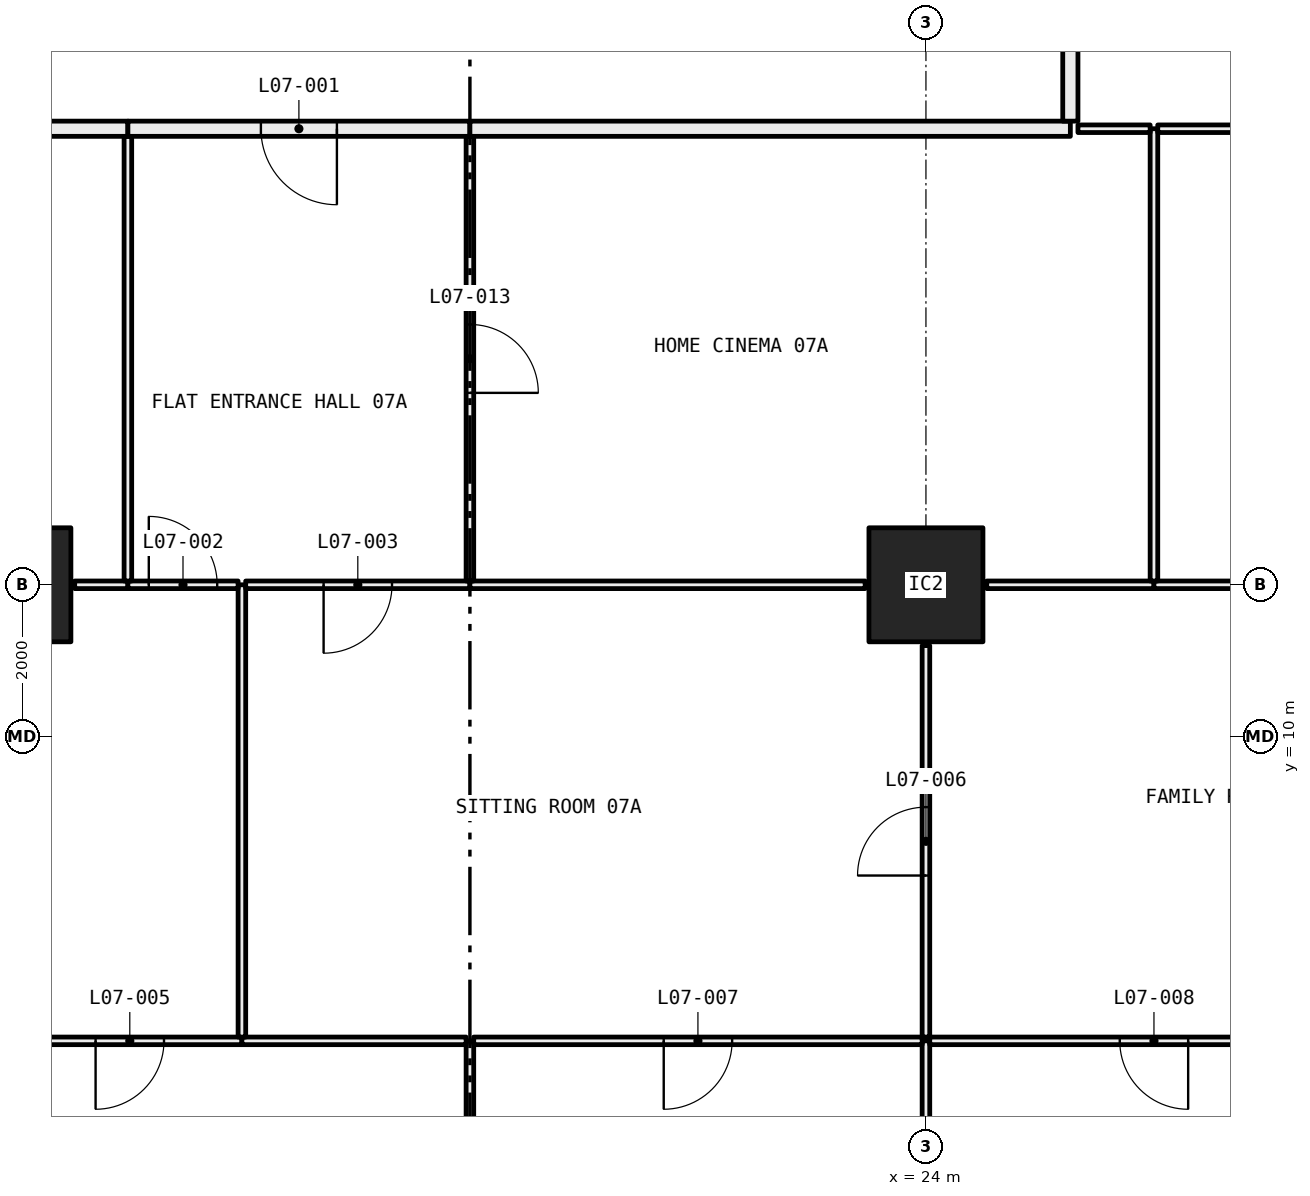
"""IFC4 building model, lengths in metres.
Left out: names, types, materials, properties, quantities, classifications, styles, units other than length and angle.
Written with IfcOpenShell. Run it as: python <this file> out.ifc"""

import sys

from ifc_helpers import new_model, si_unit, direction, frame, frame_2d, origin, origin_2d, place, context, subcontext, project, spatial, rectangle, hollow_rectangle, extrude, element, fill, save


model = new_model("IFC4")
c1 = context("Model", 3, precision=1e-05, world=origin(), true_north=direction((0.0, 1.0)))
c2 = subcontext(c1, "Body", "Model", "MODEL_VIEW")
j1 = project(units=[si_unit("LENGTHUNIT", "METRE"), si_unit("PLANEANGLEUNIT", "RADIAN")], contexts=[c1])
p1 = place(None, origin())
s1 = spatial("IfcSite", under=j1, at=p1, CompositionType="ELEMENT")
p2 = place(p1, origin())
s2 = spatial("IfcBuilding", under=s1, at=p2, CompositionType="ELEMENT")
p3 = place(p2, frame((0.0, 0.0, 36.9)))
s3 = spatial("IfcBuildingStorey", under=s2, at=p3, CompositionType="ELEMENT", Elevation=36.9)
for number, where, z_axis, x_axis in (
    (1, (12.0, 12.0, 0.0), (0.0, 0.0, 1.0), (1.0, 0.0, 0.0)),
    (2, (24.0, 12.0, 0.0), (0.0, 0.0, 1.0), (1.0, 0.0, 0.0)),
):
    element("IfcColumn", number, at=place(p3, frame(where, z_axis=z_axis, x_axis=x_axis)), inside=s3, PredefinedType="COLUMN", context=c2, shape_type="SweptSolid", body=[
        extrude(hollow_rectangle(XDim=1.5, YDim=1.5, WallThickness=0.065, at=origin_2d()), origin(), (0.0, 0.0, 1.0), 3.05),
    ])
p4 = place(p3, frame((18.0, 0.72, 0.0), z_axis=(0.0, 0.0, 1.0), x_axis=(0.0, 1.0, 0.0)))
e3 = element("IfcWall", 3, at=p4, inside=s3, PredefinedType="PARTITIONING", context=c2, shape_type="SweptSolid", body=[
    extrude(rectangle(XDim=5.28, YDim=0.1, at=frame_2d((2.64, 0.0))), origin(), (0.0, 0.0, 1.0), 3.05),
])
p5 = place(p3, frame((15.0, 6.0, 0.0), z_axis=(0.0, 0.0, 1.0), x_axis=(-1.0, 0.0, 0.0)))
e4 = element("IfcWall", 4, at=p5, inside=s3, PredefinedType="PARTITIONING", context=c2, shape_type="SweptSolid", body=[
    extrude(rectangle(XDim=2.95, YDim=0.1, at=frame_2d((1.475, 0.0))), origin(), (0.0, 0.0, 1.0), 2.45),
])
p6 = place(p5, frame((1.025, 0.0, 0.0)))
e5 = element("IfcOpeningElement", 5, at=p6, cuts=e4, PredefinedType="OPENING", context=c2, shape_type="SweptSolid", body=[
    extrude(rectangle(XDim=0.9, YDim=2.1, at=frame_2d((0.45, 1.05))), frame((0.0, 0.06, 0.0), z_axis=(0.0, -1.0, 0.0), x_axis=(1.0, 0.0, 0.0)), (0.0, 0.0, 1.0), 0.12),
])
p7 = place(p3, frame((17.95, 6.0, 0.0), z_axis=(0.0, 0.0, 1.0), x_axis=(-1.0, 0.0, 0.0)))
e6 = element("IfcWall", 6, at=p7, inside=s3, PredefinedType="PARTITIONING", context=c2, shape_type="SweptSolid", body=[
    extrude(rectangle(XDim=2.95, YDim=0.1, at=frame_2d((1.475, 0.0))), origin(), (0.0, 0.0, 1.0), 3.05),
])
p8 = place(p3, frame((24.0, 0.72, 0.0), z_axis=(0.0, 0.0, 1.0), x_axis=(0.0, 1.0, 0.0)))
e7 = element("IfcWall", 7, at=p8, inside=s3, PredefinedType="PARTITIONING", context=c2, shape_type="SweptSolid", body=[
    extrude(rectangle(XDim=5.28, YDim=0.1, at=frame_2d((2.64, 0.0))), origin(), (0.0, 0.0, 1.0), 2.45),
])
p9 = place(p3, frame((23.95, 6.0, 0.0), z_axis=(0.0, 0.0, 1.0), x_axis=(-1.0, 0.0, 0.0)))
e8 = element("IfcWall", 8, at=p9, inside=s3, PredefinedType="PARTITIONING", context=c2, shape_type="SweptSolid", body=[
    extrude(rectangle(XDim=5.9, YDim=0.1, at=frame_2d((2.95, 0.0))), origin(), (0.0, 0.0, 1.0), 2.45),
])
p10 = place(p9, frame((2.5, 0.0, 0.0)))
e9 = element("IfcOpeningElement", 9, at=p10, cuts=e8, PredefinedType="OPENING", context=c2, shape_type="SweptSolid", body=[
    extrude(rectangle(XDim=0.9, YDim=2.1, at=frame_2d((0.45, 1.05))), frame((0.0, 0.06, 0.0), z_axis=(0.0, -1.0, 0.0), x_axis=(1.0, 0.0, 0.0)), (0.0, 0.0, 1.0), 0.12),
])
p11 = place(p3, frame((29.95, 6.0, 0.0), z_axis=(0.0, 0.0, 1.0), x_axis=(-1.0, 0.0, 0.0)))
e10 = element("IfcWall", 10, at=p11, inside=s3, PredefinedType="PARTITIONING", context=c2, shape_type="SweptSolid", body=[
    extrude(rectangle(XDim=5.9, YDim=0.1, at=frame_2d((2.95, 0.0))), origin(), (0.0, 0.0, 1.0), 2.45),
])
p12 = place(p11, frame((2.5, 0.0, 0.0)))
e11 = element("IfcOpeningElement", 11, at=p12, cuts=e10, PredefinedType="OPENING", context=c2, shape_type="SweptSolid", body=[
    extrude(rectangle(XDim=0.9, YDim=2.1, at=frame_2d((0.45, 1.05))), frame((0.0, 0.06, 0.0), z_axis=(0.0, -1.0, 0.0), x_axis=(1.0, 0.0, 0.0)), (0.0, 0.0, 1.0), 0.12),
])
p13 = place(p3, frame((15.0, 6.05, 0.0), z_axis=(0.0, 0.0, 1.0), x_axis=(0.0, 1.0, 0.0)))
e12 = element("IfcWall", 12, at=p13, inside=s3, PredefinedType="PARTITIONING", context=c2, shape_type="SweptSolid", body=[
    extrude(rectangle(XDim=5.95, YDim=0.1, at=frame_2d((2.975, 0.0))), origin(), (0.0, 0.0, 1.0), 2.45),
])
p14 = place(p3, frame((13.5, 12.0, 0.0), z_axis=(0.0, 0.0, 1.0), x_axis=(-1.0, 0.0, 0.0)))
e13 = element("IfcWall", 13, at=p14, inside=s3, PredefinedType="PARTITIONING", context=c2, shape_type="SweptSolid", body=[
    extrude(rectangle(XDim=0.7, YDim=0.1, at=frame_2d((0.35, 0.0))), origin(), (0.0, 0.0, 1.0), 2.45),
])
p15 = place(p3, frame((14.95, 12.0, 0.0), z_axis=(0.0, 0.0, 1.0), x_axis=(-1.0, 0.0, 0.0)))
e14 = element("IfcWall", 14, at=p15, inside=s3, PredefinedType="PARTITIONING", context=c2, shape_type="SweptSolid", body=[
    extrude(rectangle(XDim=1.45, YDim=0.1, at=frame_2d((0.725, 0.0))), origin(), (0.0, 0.0, 1.0), 2.45),
])
p16 = place(p15, frame((0.275, 0.0, 0.0)))
e15 = element("IfcOpeningElement", 15, at=p16, cuts=e14, PredefinedType="OPENING", context=c2, shape_type="SweptSolid", body=[
    extrude(rectangle(XDim=0.9, YDim=2.1, at=frame_2d((0.45, 1.05))), frame((0.0, 0.06, 0.0), z_axis=(0.0, -1.0, 0.0), x_axis=(1.0, 0.0, 0.0)), (0.0, 0.0, 1.0), 0.12),
])
p17 = place(p3, frame((24.0, 6.05, 0.0), z_axis=(0.0, 0.0, 1.0), x_axis=(0.0, 1.0, 0.0)))
e16 = element("IfcWall", 16, at=p17, inside=s3, PredefinedType="PARTITIONING", context=c2, shape_type="SweptSolid", body=[
    extrude(rectangle(XDim=5.15, YDim=0.1, at=frame_2d((2.575, 0.0))), origin(), (0.0, 0.0, 1.0), 2.45),
])
p18 = place(p17, frame((2.125, 0.0, 0.0)))
e17 = element("IfcOpeningElement", 17, at=p18, cuts=e16, PredefinedType="OPENING", context=c2, shape_type="SweptSolid", body=[
    extrude(rectangle(XDim=0.9, YDim=2.1, at=frame_2d((0.45, 1.05))), frame((0.0, 0.06, 0.0), z_axis=(0.0, -1.0, 0.0), x_axis=(1.0, 0.0, 0.0)), (0.0, 0.0, 1.0), 0.12),
])
p19 = place(p3, frame((18.0, 12.0, 0.0), z_axis=(0.0, 0.0, 1.0), x_axis=(-1.0, 0.0, 0.0)))
e18 = element("IfcWall", 18, at=p19, inside=s3, PredefinedType="PARTITIONING", context=c2, shape_type="SweptSolid", body=[
    extrude(rectangle(XDim=2.95, YDim=0.1, at=frame_2d((1.475, 0.0))), origin(), (0.0, 0.0, 1.0), 2.45),
])
p20 = place(p19, frame((1.025, 0.0, 0.0)))
e19 = element("IfcOpeningElement", 19, at=p20, cuts=e18, PredefinedType="OPENING", context=c2, shape_type="SweptSolid", body=[
    extrude(rectangle(XDim=0.9, YDim=2.1, at=frame_2d((0.45, 1.05))), frame((0.0, 0.06, 0.0), z_axis=(0.0, -1.0, 0.0), x_axis=(1.0, 0.0, 0.0)), (0.0, 0.0, 1.0), 0.12),
])
p21 = place(p3, frame((23.2, 12.0, 0.0), z_axis=(0.0, 0.0, 1.0), x_axis=(-1.0, 0.0, 0.0)))
e20 = element("IfcWall", 20, at=p21, inside=s3, PredefinedType="PARTITIONING", context=c2, shape_type="SweptSolid", body=[
    extrude(rectangle(XDim=5.2, YDim=0.1, at=frame_2d((2.6, 0.0))), origin(), (0.0, 0.0, 1.0), 2.45),
])
p22 = place(p3, frame((27.0, 12.0, 0.0), z_axis=(0.0, 0.0, 1.0), x_axis=(-1.0, 0.0, 0.0)))
e21 = element("IfcWall", 21, at=p22, inside=s3, PredefinedType="PARTITIONING", context=c2, shape_type="SweptSolid", body=[
    extrude(rectangle(XDim=2.2, YDim=0.1, at=frame_2d((1.1, 0.0))), origin(), (0.0, 0.0, 1.0), 2.45),
])
p23 = place(p3, frame((32.95, 12.0, 0.0), z_axis=(0.0, 0.0, 1.0), x_axis=(-1.0, 0.0, 0.0)))
e22 = element("IfcWall", 22, at=p23, inside=s3, PredefinedType="PARTITIONING", context=c2, shape_type="SweptSolid", body=[
    extrude(rectangle(XDim=5.95, YDim=0.1, at=frame_2d((2.975, 0.0))), origin(), (0.0, 0.0, 1.0), 2.45),
])
p24 = place(p23, frame((2.525, 0.0, 0.0)))
e23 = element("IfcOpeningElement", 23, at=p24, cuts=e22, PredefinedType="OPENING", context=c2, shape_type="SweptSolid", body=[
    extrude(rectangle(XDim=0.9, YDim=2.1, at=frame_2d((0.45, 1.05))), frame((0.0, 0.06, 0.0), z_axis=(0.0, -1.0, 0.0), x_axis=(1.0, 0.0, 0.0)), (0.0, 0.0, 1.0), 0.12),
])
p25 = place(p3, frame((13.5, 12.05, 0.0), z_axis=(0.0, 0.0, 1.0), x_axis=(0.0, 1.0, 0.0)))
e24 = element("IfcWall", 24, at=p25, inside=s3, PredefinedType="PARTITIONING", context=c2, shape_type="SweptSolid", body=[
    extrude(rectangle(XDim=5.85, YDim=0.1, at=frame_2d((2.925, 0.0))), origin(), (0.0, 0.0, 1.0), 2.45),
])
p26 = place(p3, frame((13.5, 18.0, 0.0), z_axis=(0.0, 0.0, 1.0), x_axis=(-1.0, 0.0, 0.0)))
e25 = element("IfcWall", 25, at=p26, inside=s3, PredefinedType="PARTITIONING", context=c2, shape_type="SweptSolid", body=[
    extrude(rectangle(XDim=3.4, YDim=0.2, at=frame_2d((1.7, 0.0))), origin(), (0.0, 0.0, 1.0), 3.05),
])
p27 = place(p3, frame((18.0, 12.05, 0.0), z_axis=(0.0, 0.0, 1.0), x_axis=(0.0, 1.0, 0.0)))
e26 = element("IfcWall", 26, at=p27, inside=s3, PredefinedType="PARTITIONING", context=c2, shape_type="SweptSolid", body=[
    extrude(rectangle(XDim=5.85, YDim=0.1, at=frame_2d((2.925, 0.0))), origin(), (0.0, 0.0, 1.0), 2.45),
])
p28 = place(p27, frame((2.475, 0.0, 0.0)))
e27 = element("IfcOpeningElement", 27, at=p28, cuts=e26, PredefinedType="OPENING", context=c2, shape_type="SweptSolid", body=[
    extrude(rectangle(XDim=0.9, YDim=2.1, at=frame_2d((0.45, 1.05))), frame((0.0, 0.06, 0.0), z_axis=(0.0, -1.0, 0.0), x_axis=(1.0, 0.0, 0.0)), (0.0, 0.0, 1.0), 0.12),
])
p29 = place(p3, frame((18.0, 18.0, 0.0), z_axis=(0.0, 0.0, 1.0), x_axis=(-1.0, 0.0, 0.0)))
e28 = element("IfcWall", 28, at=p29, inside=s3, PredefinedType="PARTITIONING", context=c2, shape_type="SweptSolid", body=[
    extrude(rectangle(XDim=4.5, YDim=0.2, at=frame_2d((2.25, 0.0))), origin(), (0.0, 0.0, 1.0), 3.05),
])
p30 = place(p29, frame((1.75, 0.0, 0.0)))
e29 = element("IfcOpeningElement", 29, at=p30, cuts=e28, PredefinedType="OPENING", context=c2, shape_type="SweptSolid", body=[
    extrude(rectangle(XDim=1.0, YDim=2.1, at=frame_2d((0.5, 1.05))), frame((0.0, 0.11, 0.0), z_axis=(0.0, -1.0, 0.0), x_axis=(1.0, 0.0, 0.0)), (0.0, 0.0, 1.0), 0.22),
])
p31 = place(p3, frame((27.0, 12.05, 0.0), z_axis=(0.0, 0.0, 1.0), x_axis=(0.0, 1.0, 0.0)))
e30 = element("IfcWall", 30, at=p31, inside=s3, PredefinedType="PARTITIONING", context=c2, shape_type="SweptSolid", body=[
    extrude(rectangle(XDim=5.95, YDim=0.1, at=frame_2d((2.975, 0.0))), origin(), (0.0, 0.0, 1.0), 2.45),
])
p32 = place(p3, frame((26.95, 18.0, 0.0), z_axis=(0.0, 0.0, 1.0), x_axis=(-1.0, 0.0, 0.0)))
e31 = element("IfcWall", 31, at=p32, inside=s3, PredefinedType="PARTITIONING", context=c2, shape_type="SweptSolid", body=[
    extrude(rectangle(XDim=0.95, YDim=0.1, at=frame_2d((0.475, 0.0))), origin(), (0.0, 0.0, 1.0), 3.05),
])
p33 = place(p3, frame((25.9, 18.0, 0.0), z_axis=(0.0, 0.0, 1.0), x_axis=(-1.0, 0.0, 0.0)))
e32 = element("IfcWall", 32, at=p33, inside=s3, PredefinedType="PARTITIONING", context=c2, shape_type="SweptSolid", body=[
    extrude(rectangle(XDim=7.9, YDim=0.2, at=frame_2d((3.95, 0.0))), origin(), (0.0, 0.0, 1.0), 3.05),
])
p34 = place(p3, frame((31.5, 18.0, 0.0), z_axis=(0.0, 0.0, 1.0), x_axis=(-1.0, 0.0, 0.0)))
e33 = element("IfcWall", 33, at=p34, inside=s3, PredefinedType="PARTITIONING", context=c2, shape_type="SweptSolid", body=[
    extrude(rectangle(XDim=4.45, YDim=0.1, at=frame_2d((2.225, 0.0))), origin(), (0.0, 0.0, 1.0), 3.05),
])
p35 = place(p34, frame((1.775, 0.0, 0.0)))
e34 = element("IfcOpeningElement", 34, at=p35, cuts=e33, PredefinedType="OPENING", context=c2, shape_type="SweptSolid", body=[
    extrude(rectangle(XDim=0.9, YDim=2.1, at=frame_2d((0.45, 1.05))), frame((0.0, 0.06, 0.0), z_axis=(0.0, -1.0, 0.0), x_axis=(1.0, 0.0, 0.0)), (0.0, 0.0, 1.0), 0.12),
])
p36 = place(p3, frame((25.9, 23.9, 0.0), z_axis=(0.0, 0.0, 1.0), x_axis=(0.0, -1.0, 0.0)))
e35 = element("IfcWall", 35, at=p36, inside=s3, PredefinedType="PARTITIONING", context=c2, shape_type="SweptSolid", body=[
    extrude(rectangle(XDim=5.8, YDim=0.2, at=frame_2d((2.9, 0.0))), origin(), (0.0, 0.0, 1.0), 3.05),
])
p37 = place(p30, origin())
e36 = element("IfcDoor", 36, at=p37, inside=s3, OperationType="SINGLE_SWING_RIGHT", PredefinedType="DOOR", context=c2, shape_type="SweptSolid", body=[
    extrude(rectangle(XDim=1.0, YDim=2.1, at=frame_2d((0.5, 1.05))), frame((0.0, 0.025, 0.0), z_axis=(0.0, -1.0, 0.0), x_axis=(1.0, 0.0, 0.0)), (0.0, 0.0, 1.0), 0.05),
])
fill(e29, e36)
p38 = place(p16, frame((0.9, 0.0, 0.0), x_axis=(-1.0, 0.0, 0.0)))
e37 = element("IfcDoor", 37, at=p38, inside=s3, OperationType="SINGLE_SWING_RIGHT", PredefinedType="DOOR", context=c2, shape_type="SweptSolid", body=[
    extrude(rectangle(XDim=0.9, YDim=2.1, at=frame_2d((0.45, 1.05))), frame((0.0, 0.025, 0.0), z_axis=(0.0, -1.0, 0.0), x_axis=(1.0, 0.0, 0.0)), (0.0, 0.0, 1.0), 0.05),
])
fill(e15, e37)
p39 = place(p20, origin())
e38 = element("IfcDoor", 38, at=p39, inside=s3, OperationType="SINGLE_SWING_LEFT", PredefinedType="DOOR", context=c2, shape_type="SweptSolid", body=[
    extrude(rectangle(XDim=0.9, YDim=2.1, at=frame_2d((0.45, 1.05))), frame((0.0, 0.025, 0.0), z_axis=(0.0, -1.0, 0.0), x_axis=(1.0, 0.0, 0.0)), (0.0, 0.0, 1.0), 0.05),
])
fill(e19, e38)
p40 = place(p6, origin())
e39 = element("IfcDoor", 39, at=p40, inside=s3, OperationType="SINGLE_SWING_LEFT", PredefinedType="DOOR", context=c2, shape_type="SweptSolid", body=[
    extrude(rectangle(XDim=0.9, YDim=2.1, at=frame_2d((0.45, 1.05))), frame((0.0, 0.025, 0.0), z_axis=(0.0, -1.0, 0.0), x_axis=(1.0, 0.0, 0.0)), (0.0, 0.0, 1.0), 0.05),
])
fill(e5, e39)
p41 = place(p18, origin())
e40 = element("IfcDoor", 40, at=p41, inside=s3, OperationType="SINGLE_SWING_RIGHT", PredefinedType="DOOR", context=c2, shape_type="SweptSolid", body=[
    extrude(rectangle(XDim=0.9, YDim=2.1, at=frame_2d((0.45, 1.05))), frame((0.0, 0.025, 0.0), z_axis=(0.0, -1.0, 0.0), x_axis=(1.0, 0.0, 0.0)), (0.0, 0.0, 1.0), 0.05),
])
fill(e17, e40)
p42 = place(p10, origin())
e41 = element("IfcDoor", 41, at=p42, inside=s3, OperationType="SINGLE_SWING_LEFT", PredefinedType="DOOR", context=c2, shape_type="SweptSolid", body=[
    extrude(rectangle(XDim=0.9, YDim=2.1, at=frame_2d((0.45, 1.05))), frame((0.0, 0.025, 0.0), z_axis=(0.0, -1.0, 0.0), x_axis=(1.0, 0.0, 0.0)), (0.0, 0.0, 1.0), 0.05),
])
fill(e9, e41)
p43 = place(p12, origin())
e42 = element("IfcDoor", 42, at=p43, inside=s3, OperationType="SINGLE_SWING_RIGHT", PredefinedType="DOOR", context=c2, shape_type="SweptSolid", body=[
    extrude(rectangle(XDim=0.9, YDim=2.1, at=frame_2d((0.45, 1.05))), frame((0.0, 0.025, 0.0), z_axis=(0.0, -1.0, 0.0), x_axis=(1.0, 0.0, 0.0)), (0.0, 0.0, 1.0), 0.05),
])
fill(e11, e42)
p44 = place(p28, frame((0.9, 0.0, 0.0), x_axis=(-1.0, 0.0, 0.0)))
e43 = element("IfcDoor", 43, at=p44, inside=s3, OperationType="SINGLE_SWING_LEFT", PredefinedType="DOOR", context=c2, shape_type="SweptSolid", body=[
    extrude(rectangle(XDim=0.9, YDim=2.1, at=frame_2d((0.45, 1.05))), frame((0.0, 0.025, 0.0), z_axis=(0.0, -1.0, 0.0), x_axis=(1.0, 0.0, 0.0)), (0.0, 0.0, 1.0), 0.05),
])
fill(e27, e43)
save(model, sys.argv[1])
